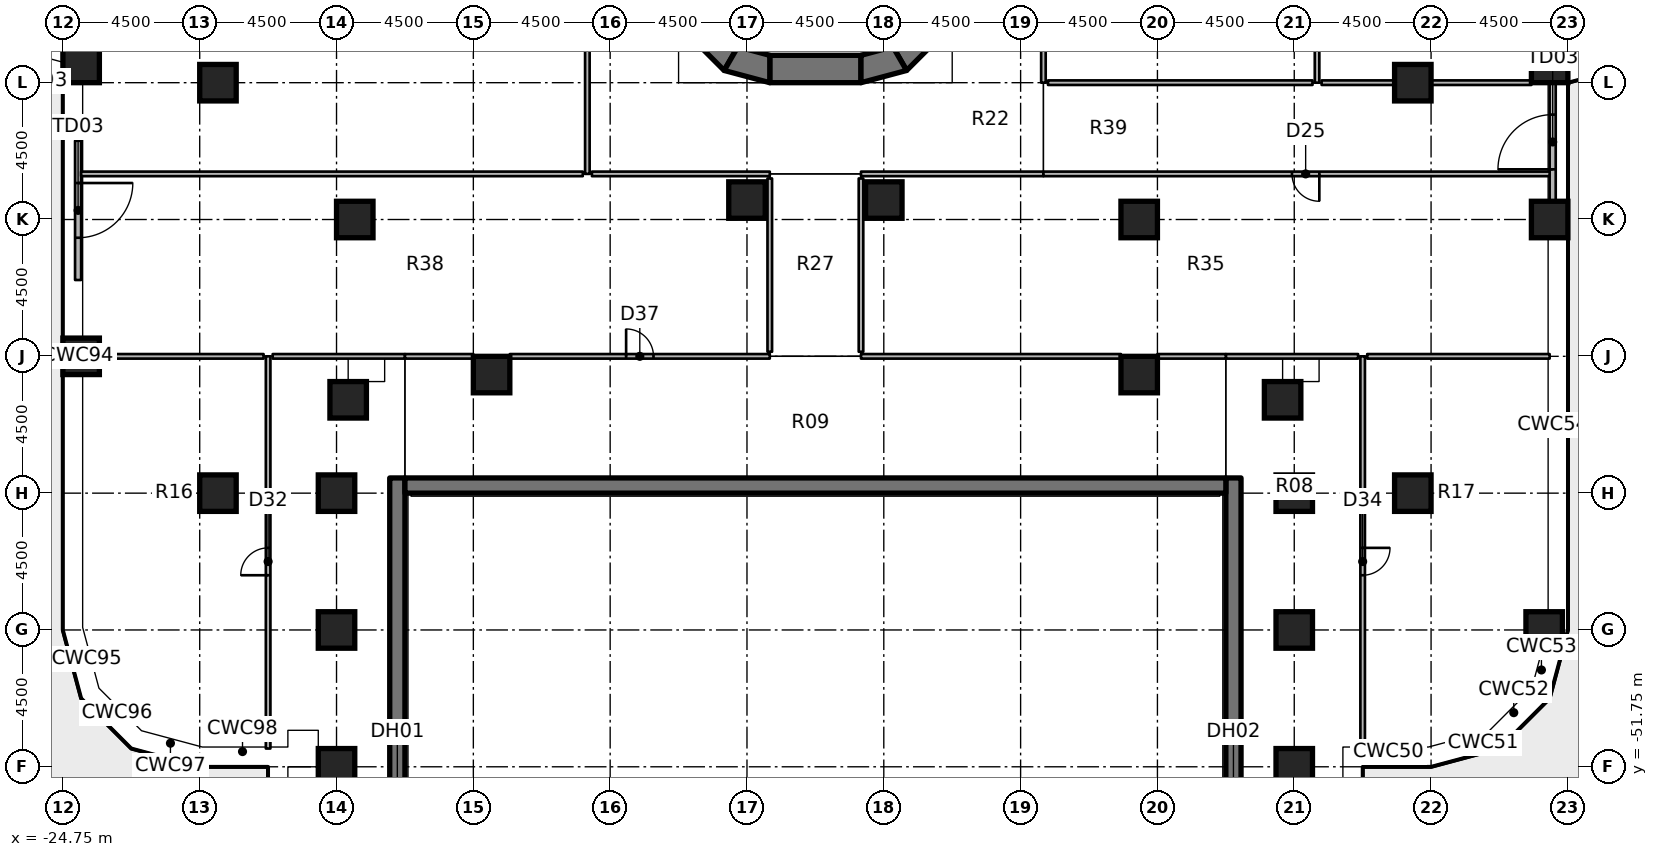
"""IFC4 building model, lengths in metres.
Left out: names, types, materials, properties, quantities, classifications, styles, units other than length and angle.
Written with IfcOpenShell. Run it as: python <this file> out.ifc"""

import sys

from ifc_helpers import new_model, si_unit, direction, frame, frame_2d, origin, origin_2d, place, context, subcontext, project, spatial, polyline, rectangle, outline, extrude, element, fill, save


model = new_model("IFC4")
c1 = context("Model", 3, precision=1e-05, world=origin(), true_north=direction((0.0, 1.0)))
c2 = subcontext(c1, "Body", "Model", "MODEL_VIEW")
j1 = project(units=[si_unit("LENGTHUNIT", "METRE"), si_unit("PLANEANGLEUNIT", "RADIAN")], contexts=[c1])
p1 = place(None, origin())
s1 = spatial("IfcSite", under=j1, at=p1, CompositionType="ELEMENT")
p2 = place(p1, origin())
s2 = spatial("IfcBuilding", under=s1, at=p2, CompositionType="ELEMENT")
p3 = place(p2, frame((0.0, 0.0, 7.0)))
s3 = spatial("IfcBuildingStorey", under=s2, at=p3, CompositionType="ELEMENT", Elevation=7.0)
for number, where, z_axis, x_axis in (
    (1, (-24.15, -38.25, 0.0), (0.0, 0.0, 1.0), (1.0, 0.0, 0.0)),
    (2, (-24.15, -28.65, 0.0), (0.0, 0.0, 1.0), (1.0, 0.0, 0.0)),
    (3, (-19.65, -42.75, 0.0), (0.0, 0.0, 1.0), (1.0, 0.0, 0.0)),
    (4, (-19.65, -29.25, 0.0), (0.0, 0.0, 1.0), (1.0, 0.0, 0.0)),
    (5, (-15.75, -51.75, 0.0), (0.0, 0.0, 1.0), (1.0, 0.0, 0.0)),
    (6, (-15.75, -47.25, 0.0), (0.0, 0.0, 1.0), (1.0, 0.0, 0.0)),
    (7, (-15.75, -42.75, 0.0), (0.0, 0.0, 1.0), (1.0, 0.0, 0.0)),
    (8, (-15.367, -39.68, 0.0), (0.0, 0.0, 1.0), (1.0, 0.0, 0.0)),
    (9, (-15.15, -33.75, 0.0), (0.0, 0.0, 1.0), (1.0, 0.0, 0.0)),
    (10, (-10.65, -38.85, 0.0), (0.0, 0.0, 1.0), (1.0, 0.0, 0.0)),
    (11, (-2.25, -33.11, 0.0), (0.0, 0.0, 1.0), (1.0, 0.0, 0.0)),
    (12, (2.25, -33.11, 0.0), (0.0, 0.0, 1.0), (1.0, 0.0, 0.0)),
    (13, (10.65, -38.85, 0.0), (0.0, 0.0, 1.0), (1.0, 0.0, 0.0)),
    (14, (10.65, -33.75, 0.0), (0.0, 0.0, 1.0), (1.0, 0.0, 0.0)),
    (15, (15.75, -51.75, 0.0), (0.0, 0.0, 1.0), (1.0, 0.0, 0.0)),
    (16, (15.75, -47.25, 0.0), (0.0, 0.0, 1.0), (1.0, 0.0, 0.0)),
    (17, (15.75, -42.75, 0.0), (0.0, 0.0, 1.0), (1.0, 0.0, 0.0)),
    (18, (15.367, -39.68, 0.0), (0.0, 0.0, 1.0), (1.0, 0.0, 0.0)),
    (19, (19.65, -42.75, 0.0), (0.0, 0.0, 1.0), (1.0, 0.0, 0.0)),
    (20, (19.65, -29.25, 0.0), (0.0, 0.0, 1.0), (1.0, 0.0, 0.0)),
    (21, (23.97, -47.25, 0.0), (0.0, 0.0, 1.0), (1.0, 0.0, 0.0)),
    (22, (24.15, -33.75, 0.0), (0.0, 0.0, 1.0), (1.0, 0.0, 0.0)),
    (23, (24.15, -28.65, 0.0), (0.0, 0.0, 1.0), (1.0, 0.0, 0.0)),
):
    element("IfcColumn", number, at=place(p3, frame(where, z_axis=z_axis, x_axis=x_axis)), inside=s3, PredefinedType="COLUMN", context=c2, shape_type="SweptSolid", body=[
        extrude(rectangle(XDim=1.2, YDim=1.2, at=origin_2d()), origin(), (0.0, 0.0, 1.0), 4.55),
    ])
p4 = place(p3, frame((-1.5, -28.8, 0.0), z_axis=(0.0, 0.0, 1.0), x_axis=(1.0, 0.0, 0.0)))
e24 = element("IfcWall", 24, at=p4, inside=s3, PredefinedType="SHEAR", context=c2, shape_type="SweptSolid", body=[
    extrude(rectangle(XDim=3.0, YDim=0.9, at=frame_2d((1.5, 0.0))), origin(), (0.0, 0.0, 1.0), 5.0),
])
p5 = place(p3, origin())
e25 = element("IfcWall", 25, at=p5, inside=s3, PredefinedType="SHEAR", context=c2, shape_type="SweptSolid", body=[
    extrude(outline(polyline([(-4.098, -27.75), (-3.0, -28.848), (-2.55, -28.069), (-3.319, -27.3), (-4.098, -27.75)])), origin(), (0.0, 0.0, 1.0), 5.0),
])
p6 = place(p3, origin())
e26 = element("IfcWall", 26, at=p6, inside=s3, PredefinedType="SHEAR", context=c2, shape_type="SweptSolid", body=[
    extrude(outline(polyline([(-3.0, -28.848), (-1.5, -29.25), (-1.5, -28.35), (-2.55, -28.069), (-3.0, -28.848)])), origin(), (0.0, 0.0, 1.0), 5.0),
])
p7 = place(p3, origin())
e27 = element("IfcWall", 27, at=p7, inside=s3, PredefinedType="SHEAR", context=c2, shape_type="SweptSolid", body=[
    extrude(outline(polyline([(4.098, -27.75), (3.0, -28.848), (2.55, -28.069), (3.319, -27.3), (4.098, -27.75)])), origin(), (0.0, 0.0, 1.0), 5.0),
])
p8 = place(p3, origin())
e28 = element("IfcWall", 28, at=p8, inside=s3, PredefinedType="SHEAR", context=c2, shape_type="SweptSolid", body=[
    extrude(outline(polyline([(3.0, -28.848), (1.5, -29.25), (1.5, -28.35), (2.55, -28.069), (3.0, -28.848)])), origin(), (0.0, 0.0, 1.0), 5.0),
])
p9 = place(p3, frame((-13.75, -63.5, 0.0), z_axis=(0.0, 0.0, 1.0), x_axis=(0.0, 1.0, 0.0)))
e29 = element("IfcWall", 29, at=p9, inside=s3, PredefinedType="SOLIDWALL", context=c2, shape_type="SweptSolid", body=[
    extrude(rectangle(XDim=21.25, YDim=0.5, at=frame_2d((10.625, 0.0))), origin(), (0.0, 0.0, 1.0), 5.0),
])
p10 = place(p9, frame((9.25, 0.0, 0.0)))
e30 = element("IfcOpeningElement", 30, at=p10, cuts=e29, PredefinedType="OPENING", context=c2, shape_type="SweptSolid", body=[
    extrude(rectangle(XDim=1.8, YDim=2.1, at=frame_2d((0.9, 1.05))), frame((0.0, 0.26, 0.0), z_axis=(0.0, -1.0, 0.0), x_axis=(1.0, 0.0, 0.0)), (0.0, 0.0, 1.0), 0.52),
])
p11 = place(p3, frame((13.75, -63.5, 0.0), z_axis=(0.0, 0.0, 1.0), x_axis=(0.0, 1.0, 0.0)))
e31 = element("IfcWall", 31, at=p11, inside=s3, PredefinedType="SOLIDWALL", context=c2, shape_type="SweptSolid", body=[
    extrude(rectangle(XDim=21.25, YDim=0.5, at=frame_2d((10.625, 0.0))), origin(), (0.0, 0.0, 1.0), 5.0),
])
p12 = place(p11, frame((9.25, 0.0, 0.0)))
e32 = element("IfcOpeningElement", 32, at=p12, cuts=e31, PredefinedType="OPENING", context=c2, shape_type="SweptSolid", body=[
    extrude(rectangle(XDim=1.8, YDim=2.1, at=frame_2d((0.9, 1.05))), frame((0.0, 0.26, 0.0), z_axis=(0.0, -1.0, 0.0), x_axis=(1.0, 0.0, 0.0)), (0.0, 0.0, 1.0), 0.52),
])
p13 = place(p3, frame((-13.5, -42.5, 0.0), z_axis=(0.0, 0.0, 1.0), x_axis=(1.0, 0.0, 0.0)))
e33 = element("IfcWall", 33, at=p13, inside=s3, PredefinedType="SOLIDWALL", context=c2, shape_type="SweptSolid", body=[
    extrude(rectangle(XDim=27.0, YDim=0.5, at=frame_2d((13.5, 0.0))), origin(), (0.0, 0.0, 1.0), 5.0),
])
p14 = place(p3, frame((24.25, -33.15, 0.0), z_axis=(0.0, 0.0, 1.0), x_axis=(0.0, 1.0, 0.0)))
e34 = element("IfcWall", 34, at=p14, inside=s3, PredefinedType="SOLIDWALL", context=c2, shape_type="SweptSolid", body=[
    extrude(rectangle(XDim=3.9, YDim=0.2, at=frame_2d((1.95, 0.0))), origin(), (0.0, 0.0, 1.0), 4.55),
])
p15 = place(p14, frame((1.05, 0.0, 0.0)))
e35 = element("IfcOpeningElement", 35, at=p15, cuts=e34, PredefinedType="OPENING", context=c2, shape_type="SweptSolid", body=[
    extrude(rectangle(XDim=1.8, YDim=2.4, at=frame_2d((0.9, 1.2))), frame((0.0, 0.11, 0.0), z_axis=(0.0, -1.0, 0.0), x_axis=(1.0, 0.0, 0.0)), (0.0, 0.0, 1.0), 0.22),
])
p16 = place(p3, frame((-24.25, -31.16, 0.0), z_axis=(0.0, 0.0, 1.0), x_axis=(0.0, -1.0, 0.0)))
e36 = element("IfcWall", 36, at=p16, inside=s3, PredefinedType="SOLIDWALL", context=c2, shape_type="SweptSolid", body=[
    extrude(rectangle(XDim=4.58, YDim=0.2, at=frame_2d((2.29, 0.0))), origin(), (0.0, 0.0, 1.0), 4.55),
])
p17 = place(p16, frame((1.39, 0.0, 0.0)))
e37 = element("IfcOpeningElement", 37, at=p17, cuts=e36, PredefinedType="OPENING", context=c2, shape_type="SweptSolid", body=[
    extrude(rectangle(XDim=1.8, YDim=2.4, at=frame_2d((0.9, 1.2))), frame((0.0, 0.11, 0.0), z_axis=(0.0, -1.0, 0.0), x_axis=(1.0, 0.0, 0.0)), (0.0, 0.0, 1.0), 0.22),
])
p18 = place(p3, frame((-18.0, -51.15, 0.0), z_axis=(0.0, 0.0, 1.0), x_axis=(0.0, 1.0, 0.0)))
e38 = element("IfcWall", 38, at=p18, inside=s3, PredefinedType="PARTITIONING", context=c2, shape_type="SweptSolid", body=[
    extrude(rectangle(XDim=12.9, YDim=0.15, at=frame_2d((6.45, 0.0))), origin(), (0.0, 0.0, 1.0), 4.55),
])
p19 = place(p18, frame((5.7, 0.0, 0.0)))
e39 = element("IfcOpeningElement", 39, at=p19, cuts=e38, PredefinedType="OPENING", context=c2, shape_type="SweptSolid", body=[
    extrude(rectangle(XDim=0.9, YDim=2.1, at=frame_2d((0.45, 1.05))), frame((0.0, 0.085, 0.0), z_axis=(0.0, -1.0, 0.0), x_axis=(1.0, 0.0, 0.0)), (0.0, 0.0, 1.0), 0.17),
])
p20 = place(p3, frame((18.0, -38.25, 0.0), z_axis=(0.0, 0.0, 1.0), x_axis=(0.0, -1.0, 0.0)))
e40 = element("IfcWall", 40, at=p20, inside=s3, PredefinedType="PARTITIONING", context=c2, shape_type="SweptSolid", body=[
    extrude(rectangle(XDim=12.9, YDim=0.15, at=frame_2d((6.45, 0.0))), origin(), (0.0, 0.0, 1.0), 4.55),
])
p21 = place(p20, frame((6.3, 0.0, 0.0)))
e41 = element("IfcOpeningElement", 41, at=p21, cuts=e40, PredefinedType="OPENING", context=c2, shape_type="SweptSolid", body=[
    extrude(rectangle(XDim=0.9, YDim=2.1, at=frame_2d((0.45, 1.05))), frame((0.0, 0.085, 0.0), z_axis=(0.0, -1.0, 0.0), x_axis=(1.0, 0.0, 0.0)), (0.0, 0.0, 1.0), 0.17),
])
for number, where, z_axis, x_axis in (
    (42, (13.5, -38.25, 0.0), (0.0, 0.0, 1.0), (1.0, 0.0, 0.0)),
    (43, (-17.85, -38.25, 0.0), (0.0, 0.0, 1.0), (1.0, 0.0, 0.0)),
):
    element("IfcWall", number, at=place(p3, frame(where, z_axis=z_axis, x_axis=x_axis)), inside=s3, PredefinedType="PARTITIONING", context=c2, shape_type="SweptSolid", body=[
        extrude(rectangle(XDim=4.35, YDim=0.15, at=frame_2d((2.175, 0.0))), origin(), (0.0, 0.0, 1.0), 4.55),
    ])
p22 = place(p3, frame((1.5, -38.25, 0.0), z_axis=(0.0, 0.0, 1.0), x_axis=(1.0, 0.0, 0.0)))
e44 = element("IfcWall", 44, at=p22, inside=s3, PredefinedType="PARTITIONING", context=c2, shape_type="SweptSolid", body=[
    extrude(rectangle(XDim=8.55, YDim=0.15, at=frame_2d((4.275, 0.0))), origin(), (0.0, 0.0, 1.0), 4.55),
])
for number, where, z_axis, x_axis in (
    (45, (11.25, -38.25, 0.0), (0.0, 0.0, 1.0), (1.0, 0.0, 0.0)),
    (46, (-13.5, -38.25, 0.0), (0.0, 0.0, 1.0), (1.0, 0.0, 0.0)),
):
    element("IfcWall", number, at=place(p3, frame(where, z_axis=z_axis, x_axis=x_axis)), inside=s3, PredefinedType="PARTITIONING", context=c2, shape_type="SweptSolid", body=[
        extrude(rectangle(XDim=2.25, YDim=0.15, at=frame_2d((1.125, 0.0))), origin(), (0.0, 0.0, 1.0), 4.55),
    ])
p23 = place(p3, frame((-10.05, -38.25, 0.0), z_axis=(0.0, 0.0, 1.0), x_axis=(1.0, 0.0, 0.0)))
e47 = element("IfcWall", 47, at=p23, inside=s3, PredefinedType="PARTITIONING", context=c2, shape_type="SweptSolid", body=[
    extrude(rectangle(XDim=8.55, YDim=0.15, at=frame_2d((4.275, 0.0))), origin(), (0.0, 0.0, 1.0), 4.55),
])
p24 = place(p23, frame((3.825, 0.0, 0.0)))
e48 = element("IfcOpeningElement", 48, at=p24, cuts=e47, PredefinedType="OPENING", context=c2, shape_type="SweptSolid", body=[
    extrude(rectangle(XDim=0.9, YDim=2.1, at=frame_2d((0.45, 1.05))), frame((0.0, 0.085, 0.0), z_axis=(0.0, -1.0, 0.0), x_axis=(1.0, 0.0, 0.0)), (0.0, 0.0, 1.0), 0.17),
])
p25 = place(p3, frame((16.5, -14.15, 0.0), z_axis=(0.0, 0.0, 1.0), x_axis=(0.0, -1.0, 0.0)))
e49 = element("IfcWall", 49, at=p25, inside=s3, PredefinedType="PARTITIONING", context=c2, shape_type="SweptSolid", body=[
    extrude(rectangle(XDim=15.1, YDim=0.15, at=frame_2d((7.55, 0.0))), origin(), (0.0, 0.0, 1.0), 4.55),
])
p26 = place(p3, frame((7.5, -14.15, 0.0), z_axis=(0.0, 0.0, 1.0), x_axis=(0.0, -1.0, 0.0)))
e50 = element("IfcWall", 50, at=p26, inside=s3, PredefinedType="PARTITIONING", context=c2, shape_type="SweptSolid", body=[
    extrude(rectangle(XDim=15.1, YDim=0.15, at=frame_2d((7.55, 0.0))), origin(), (0.0, 0.0, 1.0), 4.55),
])
p27 = place(p26, frame((7.1, 0.0, 0.0)))
e51 = element("IfcOpeningElement", 51, at=p27, cuts=e50, PredefinedType="OPENING", context=c2, shape_type="SweptSolid", body=[
    extrude(rectangle(XDim=0.9, YDim=2.1, at=frame_2d((0.45, 1.05))), frame((0.0, 0.085, 0.0), z_axis=(0.0, -1.0, 0.0), x_axis=(1.0, 0.0, 0.0)), (0.0, 0.0, 1.0), 0.17),
])
p28 = place(p3, frame((16.35, -29.25, 0.0), z_axis=(0.0, 0.0, 1.0), x_axis=(-1.0, 0.0, 0.0)))
e52 = element("IfcWall", 52, at=p28, inside=s3, PredefinedType="PARTITIONING", context=c2, shape_type="SweptSolid", body=[
    extrude(rectangle(XDim=8.7, YDim=0.15, at=frame_2d((4.35, 0.0))), origin(), (0.0, 0.0, 1.0), 4.55),
])
p29 = place(p3, frame((23.55, -29.25, 0.0), z_axis=(0.0, 0.0, 1.0), x_axis=(-1.0, 0.0, 0.0)))
e53 = element("IfcWall", 53, at=p29, inside=s3, PredefinedType="PARTITIONING", context=c2, shape_type="SweptSolid", body=[
    extrude(rectangle(XDim=3.3, YDim=0.15, at=frame_2d((1.65, 0.0))), origin(), (0.0, 0.0, 1.0), 4.55),
])
p30 = place(p3, frame((19.05, -29.25, 0.0), z_axis=(0.0, 0.0, 1.0), x_axis=(-1.0, 0.0, 0.0)))
e54 = element("IfcWall", 54, at=p30, inside=s3, PredefinedType="PARTITIONING", context=c2, shape_type="SweptSolid", body=[
    extrude(rectangle(XDim=2.4, YDim=0.15, at=frame_2d((1.2, 0.0))), origin(), (0.0, 0.0, 1.0), 4.55),
])
p31 = place(p3, frame((-23.55, -38.25, 0.0), z_axis=(0.0, 0.0, 1.0), x_axis=(1.0, 0.0, 0.0)))
e55 = element("IfcWall", 55, at=p31, inside=s3, PredefinedType="PARTITIONING", context=c2, shape_type="SweptSolid", body=[
    extrude(rectangle(XDim=5.4, YDim=0.15, at=frame_2d((2.7, 0.0))), origin(), (0.0, 0.0, 1.0), 4.55),
])
for number, where, z_axis, x_axis in (
    (56, (18.15, -38.25, 0.0), (0.0, 0.0, 1.0), (1.0, 0.0, 0.0)),
    (57, (7.5, -32.25, 0.0), (0.0, 0.0, 1.0), (-1.0, 0.0, 0.0)),
):
    element("IfcWall", number, at=place(p3, frame(where, z_axis=z_axis, x_axis=x_axis)), inside=s3, PredefinedType="PARTITIONING", context=c2, shape_type="SweptSolid", body=[
        extrude(rectangle(XDim=6.0, YDim=0.15, at=frame_2d((3.0, 0.0))), origin(), (0.0, 0.0, 1.0), 4.55),
    ])
p32 = place(p3, frame((-7.5, -32.25, 0.0), z_axis=(0.0, 0.0, 1.0), x_axis=(0.0, 1.0, 0.0)))
e58 = element("IfcWall", 58, at=p32, inside=s3, PredefinedType="PARTITIONING", context=c2, shape_type="SweptSolid", body=[
    extrude(rectangle(XDim=24.0, YDim=0.15, at=frame_2d((12.0, 0.0))), origin(), (0.0, 0.0, 1.0), 4.55),
])
p33 = place(p32, frame((12.75, 0.0, 0.0)))
e59 = element("IfcOpeningElement", 59, at=p33, cuts=e58, PredefinedType="OPENING", context=c2, shape_type="SweptSolid", body=[
    extrude(rectangle(XDim=0.9, YDim=2.1, at=frame_2d((0.45, 1.05))), frame((0.0, 0.085, 0.0), z_axis=(0.0, -1.0, 0.0), x_axis=(1.0, 0.0, 0.0)), (0.0, 0.0, 1.0), 0.17),
])
p34 = place(p3, frame((-1.5, -32.25, 0.0), z_axis=(0.0, 0.0, 1.0), x_axis=(-1.0, 0.0, 0.0)))
e60 = element("IfcWall", 60, at=p34, inside=s3, PredefinedType="PARTITIONING", context=c2, shape_type="SweptSolid", body=[
    extrude(rectangle(XDim=5.85, YDim=0.15, at=frame_2d((2.925, 0.0))), origin(), (0.0, 0.0, 1.0), 4.55),
])
for number, where, z_axis, x_axis in (
    (61, (1.5, -32.4, 0.0), (0.0, 0.0, 1.0), (0.0, -1.0, 0.0)),
    (62, (-1.5, -38.1, 0.0), (0.0, 0.0, 1.0), (0.0, 1.0, 0.0)),
):
    element("IfcWall", number, at=place(p3, frame(where, z_axis=z_axis, x_axis=x_axis)), inside=s3, PredefinedType="PARTITIONING", context=c2, shape_type="SweptSolid", body=[
        extrude(rectangle(XDim=5.7, YDim=0.15, at=frame_2d((2.85, 0.0))), origin(), (0.0, 0.0, 1.0), 4.55),
    ])
p35 = place(p3, frame((24.15, -32.25, 0.0), z_axis=(0.0, 0.0, 1.0), x_axis=(-1.0, 0.0, 0.0)))
e63 = element("IfcWall", 63, at=p35, inside=s3, PredefinedType="PARTITIONING", context=c2, shape_type="SweptSolid", body=[
    extrude(rectangle(XDim=16.65, YDim=0.15, at=frame_2d((8.325, 0.0))), origin(), (0.0, 0.0, 1.0), 4.55),
])
p36 = place(p35, frame((7.575, 0.0, 0.0)))
e64 = element("IfcOpeningElement", 64, at=p36, cuts=e63, PredefinedType="OPENING", context=c2, shape_type="SweptSolid", body=[
    extrude(rectangle(XDim=0.9, YDim=2.1, at=frame_2d((0.45, 1.05))), frame((0.0, 0.085, 0.0), z_axis=(0.0, -1.0, 0.0), x_axis=(1.0, 0.0, 0.0)), (0.0, 0.0, 1.0), 0.17),
])
p37 = place(p3, frame((-7.65, -32.25, 0.0), z_axis=(0.0, 0.0, 1.0), x_axis=(-1.0, 0.0, 0.0)))
e65 = element("IfcWall", 65, at=p37, inside=s3, PredefinedType="PARTITIONING", context=c2, shape_type="SweptSolid", body=[
    extrude(rectangle(XDim=16.5, YDim=0.15, at=frame_2d((8.25, 0.0))), origin(), (0.0, 0.0, 1.0), 4.55),
])
p38 = place(p15, origin())
e66 = element("IfcDoor", 66, at=p38, inside=s3, OperationType="SINGLE_SWING_LEFT", PredefinedType="DOOR", context=c2, shape_type="SweptSolid", body=[
    extrude(rectangle(XDim=1.8, YDim=2.4, at=frame_2d((0.9, 1.2))), frame((0.0, 0.025, 0.0), z_axis=(0.0, -1.0, 0.0), x_axis=(1.0, 0.0, 0.0)), (0.0, 0.0, 1.0), 0.05),
])
fill(e35, e66)
p39 = place(p17, origin())
e67 = element("IfcDoor", 67, at=p39, inside=s3, OperationType="SINGLE_SWING_LEFT", PredefinedType="DOOR", context=c2, shape_type="SweptSolid", body=[
    extrude(rectangle(XDim=1.8, YDim=2.4, at=frame_2d((0.9, 1.2))), frame((0.0, 0.025, 0.0), z_axis=(0.0, -1.0, 0.0), x_axis=(1.0, 0.0, 0.0)), (0.0, 0.0, 1.0), 0.05),
])
fill(e37, e67)
p40 = place(p19, origin())
e68 = element("IfcDoor", 68, at=p40, inside=s3, OperationType="SINGLE_SWING_LEFT", PredefinedType="DOOR", context=c2, shape_type="SweptSolid", body=[
    extrude(rectangle(XDim=0.9, YDim=2.1, at=frame_2d((0.45, 1.05))), frame((0.0, 0.025, 0.0), z_axis=(0.0, -1.0, 0.0), x_axis=(1.0, 0.0, 0.0)), (0.0, 0.0, 1.0), 0.05),
])
fill(e39, e68)
p41 = place(p21, origin())
e69 = element("IfcDoor", 69, at=p41, inside=s3, OperationType="SINGLE_SWING_LEFT", PredefinedType="DOOR", context=c2, shape_type="SweptSolid", body=[
    extrude(rectangle(XDim=0.9, YDim=2.1, at=frame_2d((0.45, 1.05))), frame((0.0, 0.025, 0.0), z_axis=(0.0, -1.0, 0.0), x_axis=(1.0, 0.0, 0.0)), (0.0, 0.0, 1.0), 0.05),
])
fill(e41, e69)
p42 = place(p24, origin())
e70 = element("IfcDoor", 70, at=p42, inside=s3, OperationType="SINGLE_SWING_LEFT", PredefinedType="DOOR", context=c2, shape_type="SweptSolid", body=[
    extrude(rectangle(XDim=0.9, YDim=2.1, at=frame_2d((0.45, 1.05))), frame((0.0, 0.025, 0.0), z_axis=(0.0, -1.0, 0.0), x_axis=(1.0, 0.0, 0.0)), (0.0, 0.0, 1.0), 0.05),
])
fill(e48, e70)
p43 = place(p36, origin())
e71 = element("IfcDoor", 71, at=p43, inside=s3, OperationType="SINGLE_SWING_LEFT", PredefinedType="DOOR", context=c2, shape_type="SweptSolid", body=[
    extrude(rectangle(XDim=0.9, YDim=2.1, at=frame_2d((0.45, 1.05))), frame((0.0, 0.025, 0.0), z_axis=(0.0, -1.0, 0.0), x_axis=(1.0, 0.0, 0.0)), (0.0, 0.0, 1.0), 0.05),
])
fill(e64, e71)
save(model, sys.argv[1])
